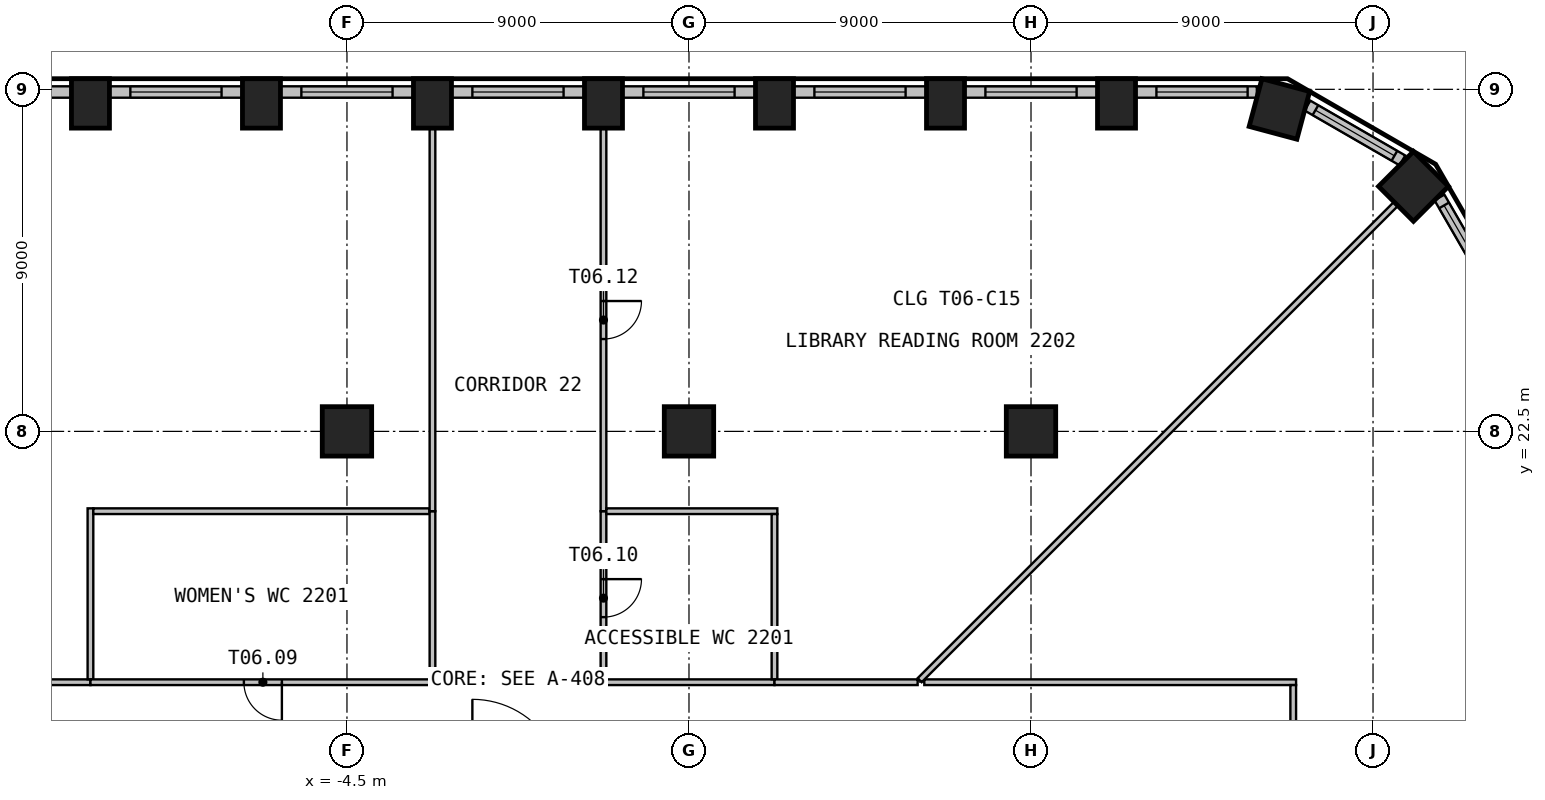
"""IFC4 building model, lengths in metres.
Left out: names, types, materials, properties, quantities, classifications, styles, units other than length and angle.
Written with IfcOpenShell. Run it as: python <this file> out.ifc"""

import sys

from ifc_helpers import new_model, si_unit, direction, frame, frame_2d, origin, origin_2d, place, context, subcontext, project, spatial, rectangle, circle, extrude, element, fill, save


model = new_model("IFC4")
c1 = context("Model", 3, precision=1e-05, world=origin(), true_north=direction((0.0, 1.0)))
c2 = subcontext(c1, "Body", "Model", "MODEL_VIEW")
j1 = project(units=[si_unit("LENGTHUNIT", "METRE"), si_unit("PLANEANGLEUNIT", "RADIAN")], contexts=[c1])
p1 = place(None, origin())
s1 = spatial("IfcSite", under=j1, at=p1, CompositionType="ELEMENT")
p2 = place(p1, origin())
s2 = spatial("IfcBuilding", under=s1, at=p2, CompositionType="ELEMENT")
p3 = place(p2, frame((0.0, 0.0, 93.0)))
s3 = spatial("IfcBuildingStorey", under=s2, at=p3, CompositionType="ELEMENT", Elevation=93.0)
for number, where, z_axis, x_axis in (
    (1, (23.564, 28.947, 0.0), (0.0, 0.0, 1.0), (-0.707, 0.707, 0.0)),
    (2, (20.037, 30.984, 0.0), (0.0, 0.0, 1.0), (-0.966, 0.259, 0.0)),
):
    element("IfcColumn", number, at=place(p3, frame(where, z_axis=z_axis, x_axis=x_axis)), inside=s3, PredefinedType="COLUMN", context=c2, shape_type="SweptSolid", body=[
        extrude(rectangle(XDim=1.3, YDim=1.3, at=origin_2d()), origin(), (0.0, 0.0, 1.0), 3.525),
    ])
for number, where, z_axis, x_axis in (
    (3, (15.75, 31.13, 0.0), (0.0, 0.0, 1.0), (-1.0, 0.0, 0.0)),
    (4, (11.25, 31.13, 0.0), (0.0, 0.0, 1.0), (-1.0, 0.0, 0.0)),
    (5, (6.75, 31.13, 0.0), (0.0, 0.0, 1.0), (-1.0, 0.0, 0.0)),
    (6, (2.25, 31.13, 0.0), (0.0, 0.0, 1.0), (-1.0, 0.0, 0.0)),
    (7, (-2.25, 31.13, 0.0), (0.0, 0.0, 1.0), (-1.0, 0.0, 0.0)),
    (8, (-6.75, 31.13, 0.0), (0.0, 0.0, 1.0), (-1.0, 0.0, 0.0)),
    (9, (-11.25, 31.13, 0.0), (0.0, 0.0, 1.0), (-1.0, 0.0, 0.0)),
):
    element("IfcColumn", number, at=place(p3, frame(where, z_axis=z_axis, x_axis=x_axis)), inside=s3, PredefinedType="COLUMN", context=c2, shape_type="SweptSolid", body=[
        extrude(rectangle(XDim=1.0, YDim=1.3, at=origin_2d()), origin(), (0.0, 0.0, 1.0), 3.525),
    ])
for number, where, z_axis, x_axis in (
    (10, (-4.5, 22.5, 0.0), (0.0, 0.0, 1.0), (1.0, 0.0, 0.0)),
    (11, (4.5, 22.5, 0.0), (0.0, 0.0, 1.0), (1.0, 0.0, 0.0)),
    (12, (13.5, 22.5, 0.0), (0.0, 0.0, 1.0), (1.0, 0.0, 0.0)),
):
    element("IfcColumn", number, at=place(p3, frame(where, z_axis=z_axis, x_axis=x_axis)), inside=s3, PredefinedType="COLUMN", context=c2, shape_type="SweptSolid", body=[
        extrude(circle(Radius=0.65, at=origin_2d()), origin(), (0.0, 0.0, 1.0), 3.525),
    ])
p4 = place(p3, frame((25.844, 25.891, 0.0), z_axis=(0.0, 0.0, 1.0), x_axis=(-0.500004907028, 0.866022570692, 0.0)))
e13 = element("IfcWall", 13, at=p4, inside=s3, PredefinedType="SOLIDWALL", context=c2, shape_type="SweptSolid", body=[
    extrude(rectangle(XDim=3.192, YDim=0.3, at=frame_2d((1.596, 0.0))), origin(), (0.0, 0.0, 1.0), 3.525),
])
p5 = place(p4, frame((0.55, 0.0, 0.9)))
e14 = element("IfcOpeningElement", 14, at=p5, cuts=e13, PredefinedType="OPENING", context=c2, shape_type="SweptSolid", body=[
    extrude(rectangle(XDim=2.4, YDim=2.1, at=frame_2d((1.2, 1.05))), frame((0.0, 0.16, 0.0), z_axis=(0.0, -1.0, 0.0), x_axis=(1.0, 0.0, 0.0)), (0.0, 0.0, 1.0), 0.32),
])
p6 = place(p3, frame((23.273, 29.63, 0.0), z_axis=(0.0, 0.0, 1.0), x_axis=(-0.866053149362, 0.49995194017, 0.0)))
e15 = element("IfcWall", 15, at=p6, inside=s3, PredefinedType="SOLIDWALL", context=c2, shape_type="SweptSolid", body=[
    extrude(rectangle(XDim=2.885, YDim=0.3, at=frame_2d((1.443, 0.0))), origin(), (0.0, 0.0, 1.0), 3.525),
])
p7 = place(p6, frame((0.243, 0.0, 0.9)))
e16 = element("IfcOpeningElement", 16, at=p7, cuts=e15, PredefinedType="OPENING", context=c2, shape_type="SweptSolid", body=[
    extrude(rectangle(XDim=2.4, YDim=2.1, at=frame_2d((1.2, 1.05))), frame((0.0, 0.16, 0.0), z_axis=(0.0, -1.0, 0.0), x_axis=(1.0, 0.0, 0.0)), (0.0, 0.0, 1.0), 0.32),
])
p8 = place(p3, frame((19.443, 31.43, 0.0), z_axis=(0.0, 0.0, 1.0), x_axis=(-1.0, 0.0, 0.0)))
e17 = element("IfcWall", 17, at=p8, inside=s3, PredefinedType="SOLIDWALL", context=c2, shape_type="SweptSolid", body=[
    extrude(rectangle(XDim=3.192, YDim=0.3, at=frame_2d((1.596, 0.0))), origin(), (0.0, 0.0, 1.0), 3.525),
])
p9 = place(p8, frame((0.243, 0.0, 0.9)))
e18 = element("IfcOpeningElement", 18, at=p9, cuts=e17, PredefinedType="OPENING", context=c2, shape_type="SweptSolid", body=[
    extrude(rectangle(XDim=2.4, YDim=2.1, at=frame_2d((1.2, 1.05))), frame((0.0, 0.16, 0.0), z_axis=(0.0, -1.0, 0.0), x_axis=(1.0, 0.0, 0.0)), (0.0, 0.0, 1.0), 0.32),
])
p10 = place(p3, frame((15.25, 31.43, 0.0), z_axis=(0.0, 0.0, 1.0), x_axis=(-1.0, 0.0, 0.0)))
e19 = element("IfcWall", 19, at=p10, inside=s3, PredefinedType="SOLIDWALL", context=c2, shape_type="SweptSolid", body=[
    extrude(rectangle(XDim=3.499, YDim=0.3, at=frame_2d((1.75, 0.0))), origin(), (0.0, 0.0, 1.0), 3.525),
])
p11 = place(p10, frame((0.55, 0.0, 0.9)))
e20 = element("IfcOpeningElement", 20, at=p11, cuts=e19, PredefinedType="OPENING", context=c2, shape_type="SweptSolid", body=[
    extrude(rectangle(XDim=2.4, YDim=2.1, at=frame_2d((1.2, 1.05))), frame((0.0, 0.16, 0.0), z_axis=(0.0, -1.0, 0.0), x_axis=(1.0, 0.0, 0.0)), (0.0, 0.0, 1.0), 0.32),
])
p12 = place(p3, frame((10.75, 31.43, 0.0), z_axis=(0.0, 0.0, 1.0), x_axis=(-1.0, 0.0, 0.0)))
e21 = element("IfcWall", 21, at=p12, inside=s3, PredefinedType="SOLIDWALL", context=c2, shape_type="SweptSolid", body=[
    extrude(rectangle(XDim=3.499, YDim=0.3, at=frame_2d((1.75, 0.0))), origin(), (0.0, 0.0, 1.0), 3.525),
])
p13 = place(p12, frame((0.55, 0.0, 0.9)))
e22 = element("IfcOpeningElement", 22, at=p13, cuts=e21, PredefinedType="OPENING", context=c2, shape_type="SweptSolid", body=[
    extrude(rectangle(XDim=2.4, YDim=2.1, at=frame_2d((1.2, 1.05))), frame((0.0, 0.16, 0.0), z_axis=(0.0, -1.0, 0.0), x_axis=(1.0, 0.0, 0.0)), (0.0, 0.0, 1.0), 0.32),
])
p14 = place(p3, frame((6.25, 31.43, 0.0), z_axis=(0.0, 0.0, 1.0), x_axis=(-1.0, 0.0, 0.0)))
e23 = element("IfcWall", 23, at=p14, inside=s3, PredefinedType="SOLIDWALL", context=c2, shape_type="SweptSolid", body=[
    extrude(rectangle(XDim=3.499, YDim=0.3, at=frame_2d((1.75, 0.0))), origin(), (0.0, 0.0, 1.0), 3.525),
])
p15 = place(p14, frame((0.55, 0.0, 0.9)))
e24 = element("IfcOpeningElement", 24, at=p15, cuts=e23, PredefinedType="OPENING", context=c2, shape_type="SweptSolid", body=[
    extrude(rectangle(XDim=2.4, YDim=2.1, at=frame_2d((1.2, 1.05))), frame((0.0, 0.16, 0.0), z_axis=(0.0, -1.0, 0.0), x_axis=(1.0, 0.0, 0.0)), (0.0, 0.0, 1.0), 0.32),
])
p16 = place(p3, frame((1.75, 31.43, 0.0), z_axis=(0.0, 0.0, 1.0), x_axis=(-1.0, 0.0, 0.0)))
e25 = element("IfcWall", 25, at=p16, inside=s3, PredefinedType="SOLIDWALL", context=c2, shape_type="SweptSolid", body=[
    extrude(rectangle(XDim=3.499, YDim=0.3, at=frame_2d((1.75, 0.0))), origin(), (0.0, 0.0, 1.0), 3.525),
])
p17 = place(p16, frame((0.55, 0.0, 0.9)))
e26 = element("IfcOpeningElement", 26, at=p17, cuts=e25, PredefinedType="OPENING", context=c2, shape_type="SweptSolid", body=[
    extrude(rectangle(XDim=2.4, YDim=2.1, at=frame_2d((1.2, 1.05))), frame((0.0, 0.16, 0.0), z_axis=(0.0, -1.0, 0.0), x_axis=(1.0, 0.0, 0.0)), (0.0, 0.0, 1.0), 0.32),
])
p18 = place(p3, frame((-2.75, 31.43, 0.0), z_axis=(0.0, 0.0, 1.0), x_axis=(-1.0, 0.0, 0.0)))
e27 = element("IfcWall", 27, at=p18, inside=s3, PredefinedType="SOLIDWALL", context=c2, shape_type="SweptSolid", body=[
    extrude(rectangle(XDim=3.499, YDim=0.3, at=frame_2d((1.75, 0.0))), origin(), (0.0, 0.0, 1.0), 3.525),
])
p19 = place(p18, frame((0.55, 0.0, 0.9)))
e28 = element("IfcOpeningElement", 28, at=p19, cuts=e27, PredefinedType="OPENING", context=c2, shape_type="SweptSolid", body=[
    extrude(rectangle(XDim=2.4, YDim=2.1, at=frame_2d((1.2, 1.05))), frame((0.0, 0.16, 0.0), z_axis=(0.0, -1.0, 0.0), x_axis=(1.0, 0.0, 0.0)), (0.0, 0.0, 1.0), 0.32),
])
p20 = place(p3, frame((-7.25, 31.43, 0.0), z_axis=(0.0, 0.0, 1.0), x_axis=(-1.0, 0.0, 0.0)))
e29 = element("IfcWall", 29, at=p20, inside=s3, PredefinedType="SOLIDWALL", context=c2, shape_type="SweptSolid", body=[
    extrude(rectangle(XDim=3.499, YDim=0.3, at=frame_2d((1.75, 0.0))), origin(), (0.0, 0.0, 1.0), 3.525),
])
p21 = place(p20, frame((0.55, 0.0, 0.9)))
e30 = element("IfcOpeningElement", 30, at=p21, cuts=e29, PredefinedType="OPENING", context=c2, shape_type="SweptSolid", body=[
    extrude(rectangle(XDim=2.4, YDim=2.1, at=frame_2d((1.2, 1.05))), frame((0.0, 0.16, 0.0), z_axis=(0.0, -1.0, 0.0), x_axis=(1.0, 0.0, 0.0)), (0.0, 0.0, 1.0), 0.32),
])
p22 = place(p3, frame((-11.75, 31.43, 0.0), z_axis=(0.0, 0.0, 1.0), x_axis=(-1.0, 0.0, 0.0)))
e31 = element("IfcWall", 31, at=p22, inside=s3, PredefinedType="SOLIDWALL", context=c2, shape_type="SweptSolid", body=[
    extrude(rectangle(XDim=3.499, YDim=0.3, at=frame_2d((1.75, 0.0))), origin(), (0.0, 0.0, 1.0), 3.525),
])
p23 = place(p22, frame((0.55, 0.0, 0.9)))
e32 = element("IfcOpeningElement", 32, at=p23, cuts=e31, PredefinedType="OPENING", context=c2, shape_type="SweptSolid", body=[
    extrude(rectangle(XDim=2.4, YDim=2.1, at=frame_2d((1.2, 1.05))), frame((0.0, 0.16, 0.0), z_axis=(0.0, -1.0, 0.0), x_axis=(1.0, 0.0, 0.0)), (0.0, 0.0, 1.0), 0.32),
])
p24 = place(p3, frame((-11.25, 15.9, 0.0), z_axis=(0.0, 0.0, 1.0), x_axis=(-1.0, 0.0, 0.0)))
e33 = element("IfcWall", 33, at=p24, inside=s3, PredefinedType="PARTITIONING", context=c2, shape_type="SweptSolid", body=[
    extrude(rectangle(XDim=9.075, YDim=0.15, at=frame_2d((4.538, 0.0))), origin(), (0.0, 0.0, 1.0), 3.525),
])
p25 = place(p3, frame((-11.25, 20.475, 0.0), z_axis=(0.0, 0.0, 1.0), x_axis=(0.0, -1.0, 0.0)))
e34 = element("IfcWall", 34, at=p25, inside=s3, PredefinedType="PARTITIONING", context=c2, shape_type="SweptSolid", body=[
    extrude(rectangle(XDim=4.5, YDim=0.15, at=frame_2d((2.25, 0.0))), origin(), (0.0, 0.0, 1.0), 3.525),
])
p26 = place(p3, frame((-2.175, 15.9, 0.0), z_axis=(0.0, 0.0, 1.0), x_axis=(-1.0, 0.0, 0.0)))
e35 = element("IfcWall", 35, at=p26, inside=s3, PredefinedType="PARTITIONING", context=c2, shape_type="SweptSolid", body=[
    extrude(rectangle(XDim=9.075, YDim=0.15, at=frame_2d((4.538, 0.0))), origin(), (0.0, 0.0, 1.0), 3.525),
])
p27 = place(p26, frame((4.038, 0.0, 0.0)))
e36 = element("IfcOpeningElement", 36, at=p27, cuts=e35, PredefinedType="OPENING", context=c2, shape_type="SweptSolid", body=[
    extrude(rectangle(XDim=1.0, YDim=2.1, at=frame_2d((0.5, 1.05))), frame((0.0, 0.085, 0.0), z_axis=(0.0, -1.0, 0.0), x_axis=(1.0, 0.0, 0.0)), (0.0, 0.0, 1.0), 0.17),
])
p28 = place(p3, frame((-2.325, 20.4, 0.0), z_axis=(0.0, 0.0, 1.0), x_axis=(-1.0, 0.0, 0.0)))
e37 = element("IfcWall", 37, at=p28, inside=s3, PredefinedType="PARTITIONING", context=c2, shape_type="SweptSolid", body=[
    extrude(rectangle(XDim=8.85, YDim=0.15, at=frame_2d((4.425, 0.0))), origin(), (0.0, 0.0, 1.0), 3.525),
])
p29 = place(p3, frame((-2.25, 15.975, 0.0), z_axis=(0.0, 0.0, 1.0), x_axis=(0.0, 1.0, 0.0)))
e38 = element("IfcWall", 38, at=p29, inside=s3, PredefinedType="PARTITIONING", context=c2, shape_type="SweptSolid", body=[
    extrude(rectangle(XDim=4.425, YDim=0.15, at=frame_2d((2.212, 0.0))), origin(), (0.0, 0.0, 1.0), 3.525),
])
p30 = place(p3, frame((-2.25, 20.4, 0.0), z_axis=(0.0, 0.0, 1.0), x_axis=(0.0, 1.0, 0.0)))
e39 = element("IfcWall", 39, at=p30, inside=s3, PredefinedType="PARTITIONING", context=c2, shape_type="SweptSolid", body=[
    extrude(rectangle(XDim=10.06, YDim=0.15, at=frame_2d((5.03, 0.0))), origin(), (0.0, 0.0, 1.0), 3.525),
])
p31 = place(p3, frame((2.25, 20.4, 0.0), z_axis=(0.0, 0.0, 1.0), x_axis=(0.0, -1.0, 0.0)))
e40 = element("IfcWall", 40, at=p31, inside=s3, PredefinedType="PARTITIONING", context=c2, shape_type="SweptSolid", body=[
    extrude(rectangle(XDim=4.575, YDim=0.15, at=frame_2d((2.288, 0.0))), origin(), (0.0, 0.0, 1.0), 3.525),
])
p32 = place(p31, frame((1.788, 0.0, 0.0)))
e41 = element("IfcOpeningElement", 41, at=p32, cuts=e40, PredefinedType="OPENING", context=c2, shape_type="SweptSolid", body=[
    extrude(rectangle(XDim=1.0, YDim=2.1, at=frame_2d((0.5, 1.05))), frame((0.0, 0.085, 0.0), z_axis=(0.0, -1.0, 0.0), x_axis=(1.0, 0.0, 0.0)), (0.0, 0.0, 1.0), 0.17),
])
p33 = place(p3, frame((6.75, 15.9, 0.0), z_axis=(0.0, 0.0, 1.0), x_axis=(-1.0, 0.0, 0.0)))
e42 = element("IfcWall", 42, at=p33, inside=s3, PredefinedType="PARTITIONING", context=c2, shape_type="SweptSolid", body=[
    extrude(rectangle(XDim=4.425, YDim=0.15, at=frame_2d((2.212, 0.0))), origin(), (0.0, 0.0, 1.0), 3.525),
])
p34 = place(p3, frame((2.25, 30.46, 0.0), z_axis=(0.0, 0.0, 1.0), x_axis=(0.0, -1.0, 0.0)))
e43 = element("IfcWall", 43, at=p34, inside=s3, PredefinedType="PARTITIONING", context=c2, shape_type="SweptSolid", body=[
    extrude(rectangle(XDim=10.06, YDim=0.15, at=frame_2d((5.03, 0.0))), origin(), (0.0, 0.0, 1.0), 3.525),
])
p35 = place(p34, frame((4.53, 0.0, 0.0)))
e44 = element("IfcOpeningElement", 44, at=p35, cuts=e43, PredefinedType="OPENING", context=c2, shape_type="SweptSolid", body=[
    extrude(rectangle(XDim=1.0, YDim=2.1, at=frame_2d((0.5, 1.05))), frame((0.0, 0.085, 0.0), z_axis=(0.0, -1.0, 0.0), x_axis=(1.0, 0.0, 0.0)), (0.0, 0.0, 1.0), 0.17),
])
p36 = place(p3, frame((2.325, 20.4, 0.0), z_axis=(0.0, 0.0, 1.0), x_axis=(1.0, 0.0, 0.0)))
e45 = element("IfcWall", 45, at=p36, inside=s3, PredefinedType="PARTITIONING", context=c2, shape_type="SweptSolid", body=[
    extrude(rectangle(XDim=4.5, YDim=0.15, at=frame_2d((2.25, 0.0))), origin(), (0.0, 0.0, 1.0), 3.525),
])
p37 = place(p3, frame((6.75, 20.325, 0.0), z_axis=(0.0, 0.0, 1.0), x_axis=(0.0, -1.0, 0.0)))
e46 = element("IfcWall", 46, at=p37, inside=s3, PredefinedType="PARTITIONING", context=c2, shape_type="SweptSolid", body=[
    extrude(rectangle(XDim=4.35, YDim=0.15, at=frame_2d((2.175, 0.0))), origin(), (0.0, 0.0, 1.0), 3.525),
])
p38 = place(p3, frame((10.517, 15.9, 0.0), z_axis=(0.0, 0.0, 1.0), x_axis=(-1.0, 0.0, 0.0)))
e47 = element("IfcWall", 47, at=p38, inside=s3, PredefinedType="PARTITIONING", context=c2, shape_type="SweptSolid", body=[
    extrude(rectangle(XDim=3.767, YDim=0.15, at=frame_2d((1.884, 0.0))), origin(), (0.0, 0.0, 1.0), 3.525),
])
p39 = place(p3, frame((20.475, 15.9, 0.0), z_axis=(0.0, 0.0, 1.0), x_axis=(-1.0, 0.0, 0.0)))
e48 = element("IfcWall", 48, at=p39, inside=s3, PredefinedType="PARTITIONING", context=c2, shape_type="SweptSolid", body=[
    extrude(rectangle(XDim=9.783, YDim=0.15, at=frame_2d((4.892, 0.0))), origin(), (0.0, 0.0, 1.0), 3.525),
])
p40 = place(p3, frame((23.09, 28.473, 0.0), z_axis=(0.0, 0.0, 1.0), x_axis=(-0.707099887057, -0.707113675249, 0.0)))
e49 = element("IfcWall", 49, at=p40, inside=s3, PredefinedType="PARTITIONING", context=c2, shape_type="SweptSolid", body=[
    extrude(rectangle(XDim=17.707, YDim=0.15, at=frame_2d((8.853, 0.0))), origin(), (0.0, 0.0, 1.0), 3.525),
])
p41 = place(p3, frame((20.4, 1.516, 0.0), z_axis=(0.0, 0.0, 1.0), x_axis=(0.0, 1.0, 0.0)))
e50 = element("IfcWall", 50, at=p41, inside=s3, PredefinedType="PARTITIONING", context=c2, shape_type="SweptSolid", body=[
    extrude(rectangle(XDim=14.309, YDim=0.15, at=frame_2d((7.154, 0.0))), origin(), (0.0, 0.0, 1.0), 3.525),
])
p42 = place(p41, frame((6.655, 0.0, 0.0)))
e51 = element("IfcOpeningElement", 51, at=p42, cuts=e50, PredefinedType="OPENING", context=c2, shape_type="SweptSolid", body=[
    extrude(rectangle(XDim=1.0, YDim=2.1, at=frame_2d((0.5, 1.05))), frame((0.0, 0.085, 0.0), z_axis=(0.0, -1.0, 0.0), x_axis=(1.0, 0.0, 0.0)), (0.0, 0.0, 1.0), 0.17),
])
p43 = place(p5, origin())
e52 = element("IfcWindow", 52, at=p43, inside=s3, PartitioningType="SINGLE_PANEL", PredefinedType="WINDOW", context=c2, shape_type="SweptSolid", body=[
    extrude(rectangle(XDim=2.4, YDim=2.1, at=frame_2d((1.2, 1.05))), frame((0.0, 0.03, 0.0), z_axis=(0.0, -1.0, 0.0), x_axis=(1.0, 0.0, 0.0)), (0.0, 0.0, 1.0), 0.06),
])
fill(e14, e52)
p44 = place(p7, origin())
e53 = element("IfcWindow", 53, at=p44, inside=s3, PartitioningType="SINGLE_PANEL", PredefinedType="WINDOW", context=c2, shape_type="SweptSolid", body=[
    extrude(rectangle(XDim=2.4, YDim=2.1, at=frame_2d((1.2, 1.05))), frame((0.0, 0.03, 0.0), z_axis=(0.0, -1.0, 0.0), x_axis=(1.0, 0.0, 0.0)), (0.0, 0.0, 1.0), 0.06),
])
fill(e16, e53)
p45 = place(p9, origin())
e54 = element("IfcWindow", 54, at=p45, inside=s3, PartitioningType="SINGLE_PANEL", PredefinedType="WINDOW", context=c2, shape_type="SweptSolid", body=[
    extrude(rectangle(XDim=2.4, YDim=2.1, at=frame_2d((1.2, 1.05))), frame((0.0, 0.03, 0.0), z_axis=(0.0, -1.0, 0.0), x_axis=(1.0, 0.0, 0.0)), (0.0, 0.0, 1.0), 0.06),
])
fill(e18, e54)
p46 = place(p11, origin())
e55 = element("IfcWindow", 55, at=p46, inside=s3, PartitioningType="SINGLE_PANEL", PredefinedType="WINDOW", context=c2, shape_type="SweptSolid", body=[
    extrude(rectangle(XDim=2.4, YDim=2.1, at=frame_2d((1.2, 1.05))), frame((0.0, 0.03, 0.0), z_axis=(0.0, -1.0, 0.0), x_axis=(1.0, 0.0, 0.0)), (0.0, 0.0, 1.0), 0.06),
])
fill(e20, e55)
p47 = place(p13, origin())
e56 = element("IfcWindow", 56, at=p47, inside=s3, PartitioningType="SINGLE_PANEL", PredefinedType="WINDOW", context=c2, shape_type="SweptSolid", body=[
    extrude(rectangle(XDim=2.4, YDim=2.1, at=frame_2d((1.2, 1.05))), frame((0.0, 0.03, 0.0), z_axis=(0.0, -1.0, 0.0), x_axis=(1.0, 0.0, 0.0)), (0.0, 0.0, 1.0), 0.06),
])
fill(e22, e56)
p48 = place(p15, origin())
e57 = element("IfcWindow", 57, at=p48, inside=s3, PartitioningType="SINGLE_PANEL", PredefinedType="WINDOW", context=c2, shape_type="SweptSolid", body=[
    extrude(rectangle(XDim=2.4, YDim=2.1, at=frame_2d((1.2, 1.05))), frame((0.0, 0.03, 0.0), z_axis=(0.0, -1.0, 0.0), x_axis=(1.0, 0.0, 0.0)), (0.0, 0.0, 1.0), 0.06),
])
fill(e24, e57)
p49 = place(p17, origin())
e58 = element("IfcWindow", 58, at=p49, inside=s3, PartitioningType="SINGLE_PANEL", PredefinedType="WINDOW", context=c2, shape_type="SweptSolid", body=[
    extrude(rectangle(XDim=2.4, YDim=2.1, at=frame_2d((1.2, 1.05))), frame((0.0, 0.03, 0.0), z_axis=(0.0, -1.0, 0.0), x_axis=(1.0, 0.0, 0.0)), (0.0, 0.0, 1.0), 0.06),
])
fill(e26, e58)
p50 = place(p19, origin())
e59 = element("IfcWindow", 59, at=p50, inside=s3, PartitioningType="SINGLE_PANEL", PredefinedType="WINDOW", context=c2, shape_type="SweptSolid", body=[
    extrude(rectangle(XDim=2.4, YDim=2.1, at=frame_2d((1.2, 1.05))), frame((0.0, 0.03, 0.0), z_axis=(0.0, -1.0, 0.0), x_axis=(1.0, 0.0, 0.0)), (0.0, 0.0, 1.0), 0.06),
])
fill(e28, e59)
p51 = place(p21, origin())
e60 = element("IfcWindow", 60, at=p51, inside=s3, PartitioningType="SINGLE_PANEL", PredefinedType="WINDOW", context=c2, shape_type="SweptSolid", body=[
    extrude(rectangle(XDim=2.4, YDim=2.1, at=frame_2d((1.2, 1.05))), frame((0.0, 0.03, 0.0), z_axis=(0.0, -1.0, 0.0), x_axis=(1.0, 0.0, 0.0)), (0.0, 0.0, 1.0), 0.06),
])
fill(e30, e60)
p52 = place(p27, origin())
e61 = element("IfcDoor", 61, at=p52, inside=s3, OperationType="SINGLE_SWING_RIGHT", PredefinedType="DOOR", context=c2, shape_type="SweptSolid", body=[
    extrude(rectangle(XDim=1.0, YDim=2.1, at=frame_2d((0.5, 1.05))), frame((0.0, 0.025, 0.0), z_axis=(0.0, -1.0, 0.0), x_axis=(1.0, 0.0, 0.0)), (0.0, 0.0, 1.0), 0.05),
])
fill(e36, e61)
p53 = place(p32, origin())
e62 = element("IfcDoor", 62, at=p53, inside=s3, OperationType="SINGLE_SWING_LEFT", PredefinedType="DOOR", context=c2, shape_type="SweptSolid", body=[
    extrude(rectangle(XDim=1.0, YDim=2.1, at=frame_2d((0.5, 1.05))), frame((0.0, 0.025, 0.0), z_axis=(0.0, -1.0, 0.0), x_axis=(1.0, 0.0, 0.0)), (0.0, 0.0, 1.0), 0.05),
])
fill(e41, e62)
p54 = place(p35, origin())
e63 = element("IfcDoor", 63, at=p54, inside=s3, OperationType="SINGLE_SWING_LEFT", PredefinedType="DOOR", context=c2, shape_type="SweptSolid", body=[
    extrude(rectangle(XDim=1.0, YDim=2.1, at=frame_2d((0.5, 1.05))), frame((0.0, 0.025, 0.0), z_axis=(0.0, -1.0, 0.0), x_axis=(1.0, 0.0, 0.0)), (0.0, 0.0, 1.0), 0.05),
])
fill(e44, e63)
save(model, sys.argv[1])
